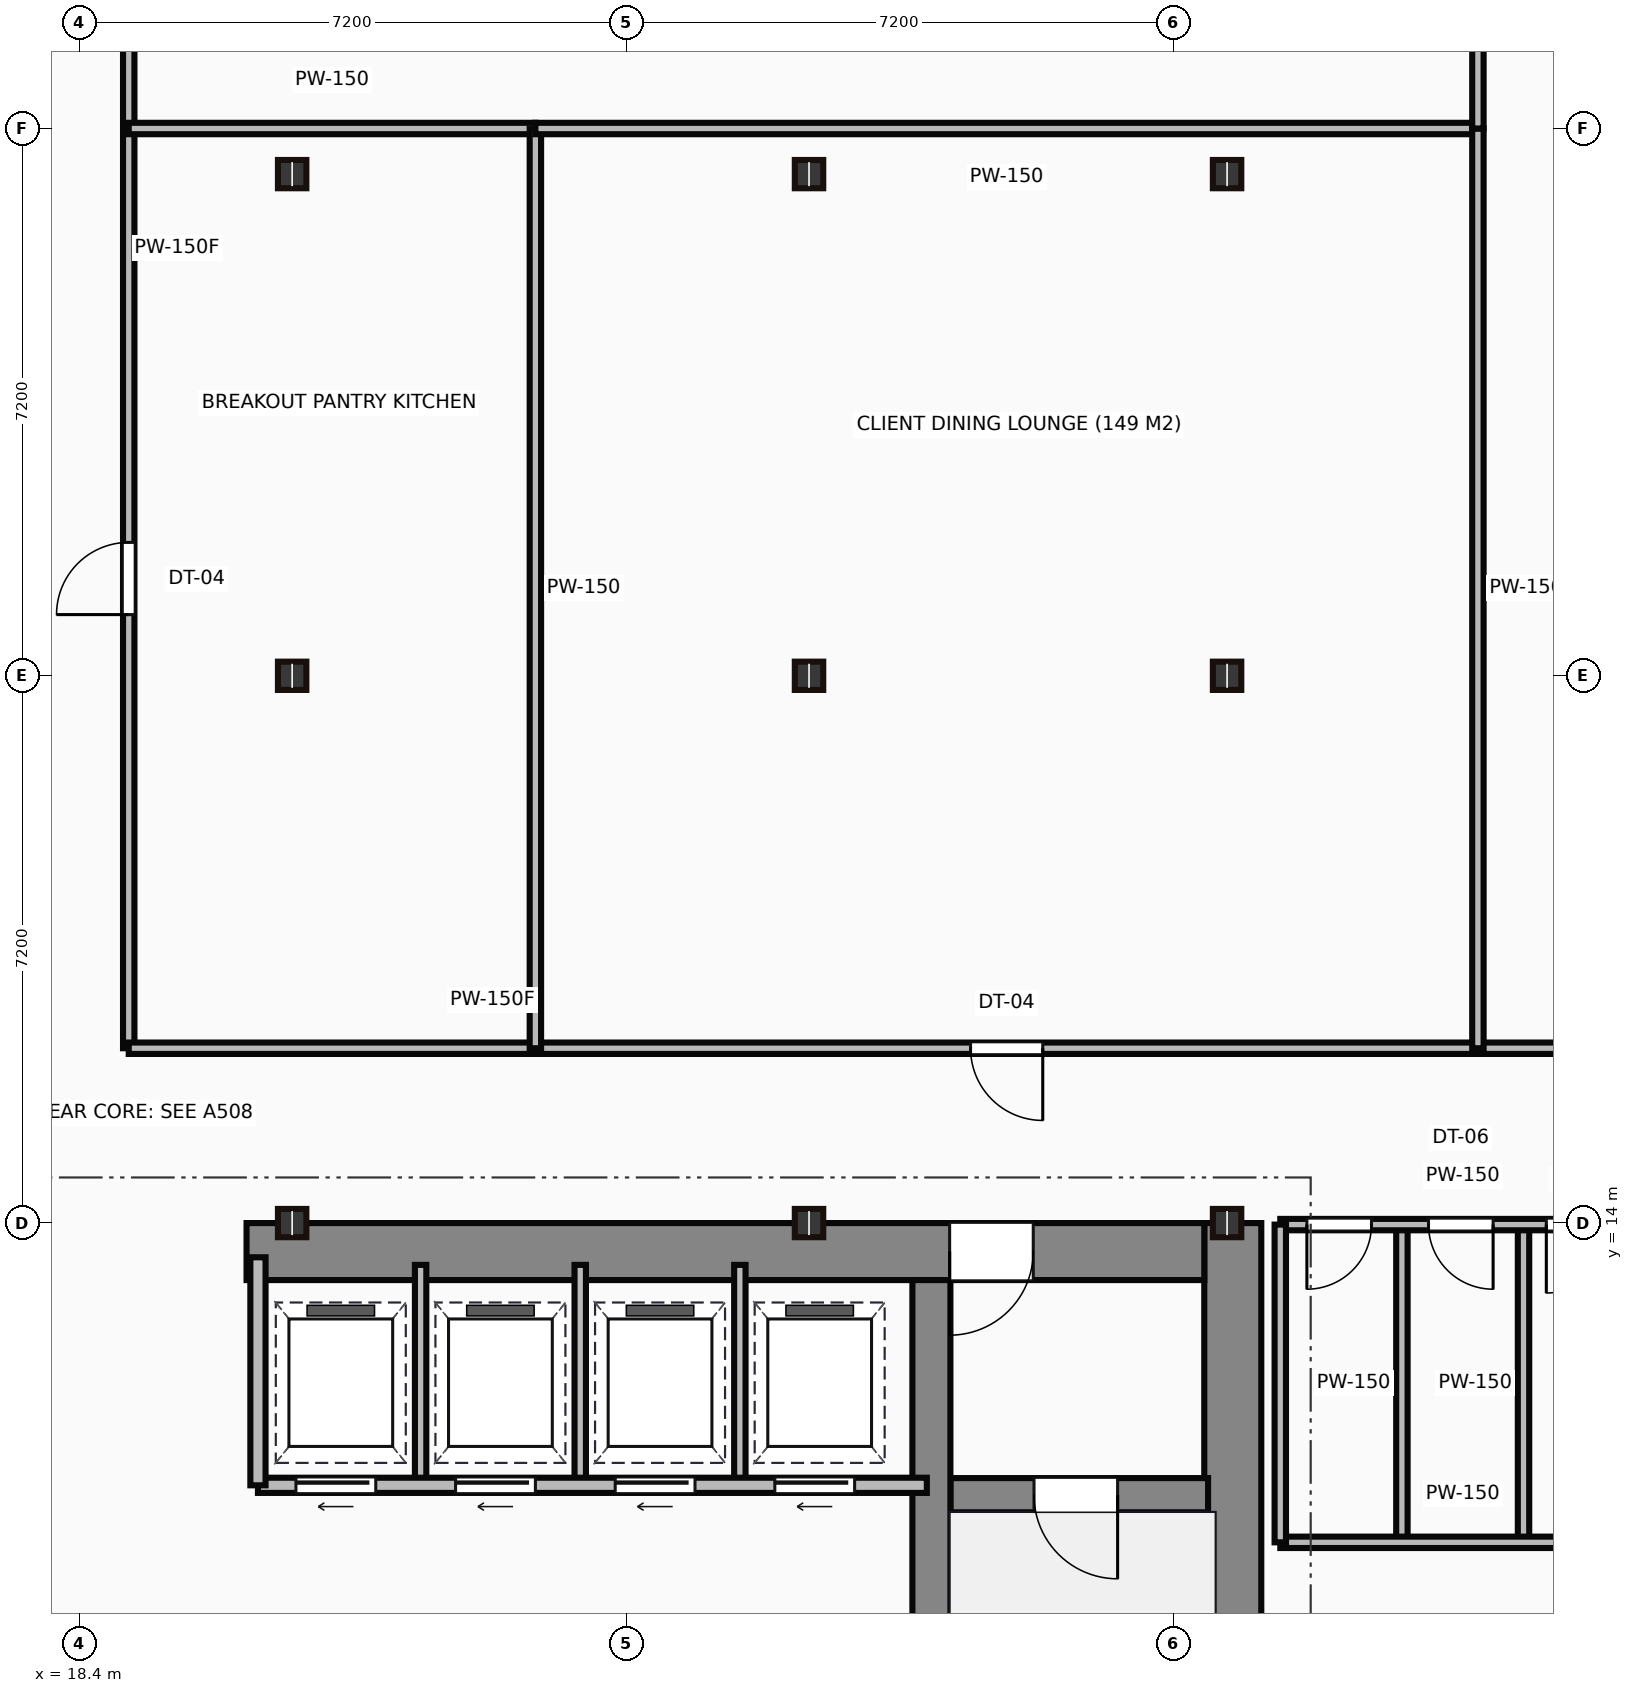
"""IFC4 building model, lengths in metres.
Left out: names, types, materials, properties, quantities, classifications, styles, units other than length and angle.
Written with IfcOpenShell. Run it as: python <this file> out.ifc"""

import sys

from ifc_helpers import new_model, si_unit, direction, frame, frame_2d, origin, origin_2d, place, context, subcontext, project, spatial, rectangle, i_section, extrude, source, transform, mapped, element, fill, save


model = new_model("IFC4")
c1 = context("Model", 3, precision=1e-05, world=origin(), true_north=direction((0.0, 1.0)))
c2 = subcontext(c1, "Body", "Model", "MODEL_VIEW")
j1 = project(units=[si_unit("LENGTHUNIT", "METRE"), si_unit("PLANEANGLEUNIT", "RADIAN")], contexts=[c1])
p1 = place(None, origin())
s1 = spatial("IfcSite", under=j1, at=p1, CompositionType="ELEMENT")
p2 = place(p1, origin())
s2 = spatial("IfcBuilding", under=s1, at=p2, CompositionType="ELEMENT")
p3 = place(p2, frame((0.0, 0.0, 184.4)))
s3 = spatial("IfcBuildingStorey", under=s2, at=p3, CompositionType="ELEMENT", Elevation=184.4)
m1 = source(origin(), c2, "Body", "SweptSolid", [
    extrude(rectangle(XDim=13.1, YDim=0.75, at=frame_2d((6.55, 0.0))), origin(), (0.0, 0.0, 1.0), 4.2),
])
p4 = place(p3, frame((33.575, 0.9, 0.0), z_axis=(0.0, 0.0, 1.0), x_axis=(0.0, 1.0, 0.0)))
e1 = element("IfcWall", 1, at=p4, inside=s3, PredefinedType="SHEAR", context=c2, shape_type="MappedRepresentation", body=[
    mapped(m1, transform((0.0, 0.0, 0.0))),
])
m2 = source(origin(), c2, "Body", "SweptSolid", [
    extrude(rectangle(XDim=12.6, YDim=0.75, at=frame_2d((6.3, 0.0))), origin(), (0.0, 0.0, 1.0), 4.2),
])
p5 = place(p3, frame((20.6, 13.625, 0.0), z_axis=(0.0, 0.0, 1.0), x_axis=(1.0, 0.0, 0.0)))
e2 = element("IfcWall", 2, at=p5, inside=s3, PredefinedType="SHEAR", context=c2, shape_type="MappedRepresentation", body=[
    mapped(m2, transform((0.0, 0.0, 0.0))),
])
p6 = place(p5, frame((9.25, 0.0, 0.0)))
e3 = element("IfcOpeningElement", 3, at=p6, cuts=e2, PredefinedType="OPENING", context=c2, shape_type="SweptSolid", body=[
    extrude(rectangle(XDim=1.1, YDim=2.15, at=frame_2d((0.55, 1.075))), frame((0.0, 0.385, 0.0), z_axis=(0.0, -1.0, 0.0), x_axis=(1.0, 0.0, 0.0)), (0.0, 0.0, 1.0), 0.77),
])
m3 = source(origin(), c2, "Body", "SweptSolid", [
    extrude(rectangle(XDim=12.35, YDim=0.5, at=frame_2d((6.175, 0.0))), origin(), (0.0, 0.0, 1.0), 4.2),
])
p7 = place(p3, frame((29.61, 0.9, 0.0), z_axis=(0.0, 0.0, 1.0), x_axis=(0.0, 1.0, 0.0)))
e4 = element("IfcWall", 4, at=p7, inside=s3, PredefinedType="SHEAR", context=c2, shape_type="MappedRepresentation", body=[
    mapped(m3, transform((0.0, 0.0, 0.0))),
])
m4 = source(origin(), c2, "Body", "SweptSolid", [
    extrude(rectangle(XDim=3.39, YDim=0.45, at=frame_2d((1.695, 0.0))), origin(), (0.0, 0.0, 1.0), 4.2),
])
p8 = place(p3, frame((29.86, 10.42, 0.0), z_axis=(0.0, 0.0, 1.0), x_axis=(1.0, 0.0, 0.0)))
e5 = element("IfcWall", 5, at=p8, inside=s3, PredefinedType="SHEAR", context=c2, shape_type="MappedRepresentation", body=[
    mapped(m4, transform((0.0, 0.0, 0.0))),
])
p9 = place(p8, frame((1.1, 0.0, 0.0)))
e6 = element("IfcOpeningElement", 6, at=p9, cuts=e5, PredefinedType="OPENING", context=c2, shape_type="SweptSolid", body=[
    extrude(rectangle(XDim=1.1, YDim=2.15, at=frame_2d((0.55, 1.075))), frame((0.0, 0.235, 0.0), z_axis=(0.0, -1.0, 0.0), x_axis=(1.0, 0.0, 0.0)), (0.0, 0.0, 1.0), 0.47),
])
m5 = source(origin(), c2, "Body", "SweptSolid", [
    extrude(i_section(OverallWidth=0.374, OverallDepth=0.372, WebThickness=0.016, FlangeThickness=0.026, at=origin_2d()), origin(), (0.0, 0.0, 1.0), 4.2),
])
for number, where, z_axis, x_axis in (
    (7, (21.2, 14.0, 0.0), (0.0, 0.0, 1.0), (1.0, 0.0, 0.0)),
    (8, (21.2, 21.2, 0.0), (0.0, 0.0, 1.0), (1.0, 0.0, 0.0)),
    (9, (21.2, 27.8, 0.0), (0.0, 0.0, 1.0), (1.0, 0.0, 0.0)),
    (10, (28.0, 14.0, 0.0), (0.0, 0.0, 1.0), (1.0, 0.0, 0.0)),
    (11, (28.0, 21.2, 0.0), (0.0, 0.0, 1.0), (1.0, 0.0, 0.0)),
    (12, (28.0, 27.8, 0.0), (0.0, 0.0, 1.0), (1.0, 0.0, 0.0)),
    (13, (33.5, 14.0, 0.0), (0.0, 0.0, 1.0), (1.0, 0.0, 0.0)),
    (14, (33.5, 21.2, 0.0), (0.0, 0.0, 1.0), (1.0, 0.0, 0.0)),
    (15, (33.5, 27.8, 0.0), (0.0, 0.0, 1.0), (1.0, 0.0, 0.0)),
):
    element("IfcColumn", number, at=place(p3, frame(where, z_axis=z_axis, x_axis=x_axis)), inside=s3, PredefinedType="COLUMN", context=c2, shape_type="MappedRepresentation", body=[
        mapped(m5, transform((0.0, 0.0, 0.0))),
    ])
m6 = source(origin(), c2, "Body", "SweptSolid", [
    extrude(rectangle(XDim=8.8, YDim=0.2, at=frame_2d((4.4, 0.0))), origin(), (0.0, 0.0, 1.0), 3.95),
])
p10 = place(p3, frame((20.75, 10.55, 0.0), z_axis=(0.0, 0.0, 1.0), x_axis=(1.0, 0.0, 0.0)))
e16 = element("IfcWall", 16, at=p10, inside=s3, PredefinedType="PARTITIONING", context=c2, shape_type="MappedRepresentation", body=[
    mapped(m6, transform((0.0, 0.0, 0.0))),
])
p11 = place(p10, frame((0.5, 0.0, 0.0)))
e17 = element("IfcOpeningElement", 17, at=p11, cuts=e16, PredefinedType="OPENING", context=c2, shape_type="SweptSolid", body=[
    extrude(rectangle(XDim=1.05, YDim=2.15, at=frame_2d((0.525, 1.075))), frame((0.0, 0.11, 0.0), z_axis=(0.0, -1.0, 0.0), x_axis=(1.0, 0.0, 0.0)), (0.0, 0.0, 1.0), 0.22),
])
p12 = place(p10, frame((2.6, 0.0, 0.0)))
e18 = element("IfcOpeningElement", 18, at=p12, cuts=e16, PredefinedType="OPENING", context=c2, shape_type="SweptSolid", body=[
    extrude(rectangle(XDim=1.05, YDim=2.15, at=frame_2d((0.525, 1.075))), frame((0.0, 0.11, 0.0), z_axis=(0.0, -1.0, 0.0), x_axis=(1.0, 0.0, 0.0)), (0.0, 0.0, 1.0), 0.22),
])
p13 = place(p10, frame((4.7, 0.0, 0.0)))
e19 = element("IfcOpeningElement", 19, at=p13, cuts=e16, PredefinedType="OPENING", context=c2, shape_type="SweptSolid", body=[
    extrude(rectangle(XDim=1.05, YDim=2.15, at=frame_2d((0.525, 1.075))), frame((0.0, 0.11, 0.0), z_axis=(0.0, -1.0, 0.0), x_axis=(1.0, 0.0, 0.0)), (0.0, 0.0, 1.0), 0.22),
])
p14 = place(p10, frame((6.8, 0.0, 0.0)))
e20 = element("IfcOpeningElement", 20, at=p14, cuts=e16, PredefinedType="OPENING", context=c2, shape_type="SweptSolid", body=[
    extrude(rectangle(XDim=1.05, YDim=2.15, at=frame_2d((0.525, 1.075))), frame((0.0, 0.11, 0.0), z_axis=(0.0, -1.0, 0.0), x_axis=(1.0, 0.0, 0.0)), (0.0, 0.0, 1.0), 0.22),
])
m7 = source(origin(), c2, "Body", "SweptSolid", [
    extrude(rectangle(XDim=3.0, YDim=0.2, at=frame_2d((1.5, 0.0))), origin(), (0.0, 0.0, 1.0), 3.95),
])
p15 = place(p3, frame((20.75, 10.55, 0.0), z_axis=(0.0, 0.0, 1.0), x_axis=(0.0, 1.0, 0.0)))
e21 = element("IfcWall", 21, at=p15, inside=s3, PredefinedType="PARTITIONING", context=c2, shape_type="MappedRepresentation", body=[
    mapped(m7, transform((0.0, 0.0, 0.0))),
])
m8 = source(origin(), c2, "Body", "SweptSolid", [
    extrude(rectangle(XDim=2.85, YDim=0.15, at=frame_2d((1.425, 0.0))), origin(), (0.0, 0.0, 1.0), 3.95),
])
for number, where, z_axis, x_axis in (
    (22, (22.89, 10.6, 0.0), (0.0, 0.0, 1.0), (0.0, 1.0, 0.0)),
    (23, (24.99, 10.6, 0.0), (0.0, 0.0, 1.0), (0.0, 1.0, 0.0)),
    (24, (27.09, 10.6, 0.0), (0.0, 0.0, 1.0), (0.0, 1.0, 0.0)),
):
    element("IfcWall", number, at=place(p3, frame(where, z_axis=z_axis, x_axis=x_axis)), inside=s3, PredefinedType="PARTITIONING", context=c2, shape_type="MappedRepresentation", body=[
        mapped(m8, transform((0.0, 0.0, 0.0))),
    ])
m9 = source(origin(), c2, "Body", "SweptSolid", [
    extrude(rectangle(XDim=4.8, YDim=0.15, at=frame_2d((2.4, 0.0))), origin(), (0.0, 0.0, 1.0), 2.895),
])
p16 = place(p3, frame((34.2, 13.98, 0.0), z_axis=(0.0, 0.0, 1.0), x_axis=(1.0, 0.0, 0.0)))
e25 = element("IfcWall", 25, at=p16, inside=s3, PredefinedType="PARTITIONING", context=c2, shape_type="MappedRepresentation", body=[
    mapped(m9, transform((0.0, 0.0, 0.0))),
])
p17 = place(p16, frame((0.35, 0.0, 0.0)))
e26 = element("IfcOpeningElement", 26, at=p17, cuts=e25, PredefinedType="OPENING", context=c2, shape_type="SweptSolid", body=[
    extrude(rectangle(XDim=0.85, YDim=2.1, at=frame_2d((0.425, 1.05))), frame((0.0, 0.085, 0.0), z_axis=(0.0, -1.0, 0.0), x_axis=(1.0, 0.0, 0.0)), (0.0, 0.0, 1.0), 0.17),
])
p18 = place(p16, frame((1.95, 0.0, 0.0)))
e27 = element("IfcOpeningElement", 27, at=p18, cuts=e25, PredefinedType="OPENING", context=c2, shape_type="SweptSolid", body=[
    extrude(rectangle(XDim=0.85, YDim=2.1, at=frame_2d((0.425, 1.05))), frame((0.0, 0.085, 0.0), z_axis=(0.0, -1.0, 0.0), x_axis=(1.0, 0.0, 0.0)), (0.0, 0.0, 1.0), 0.17),
])
p19 = place(p16, frame((3.5, 0.0, 0.0)))
e28 = element("IfcOpeningElement", 28, at=p19, cuts=e25, PredefinedType="OPENING", context=c2, shape_type="SweptSolid", body=[
    extrude(rectangle(XDim=0.9, YDim=2.1, at=frame_2d((0.45, 1.05))), frame((0.0, 0.085, 0.0), z_axis=(0.0, -1.0, 0.0), x_axis=(1.0, 0.0, 0.0)), (0.0, 0.0, 1.0), 0.17),
])
m10 = source(origin(), c2, "Body", "SweptSolid", [
    extrude(rectangle(XDim=4.8, YDim=0.15, at=frame_2d((2.4, 0.0))), origin(), (0.0, 0.0, 1.0), 3.95),
])
p20 = place(p3, frame((34.2, 9.8, 0.0), z_axis=(0.0, 0.0, 1.0), x_axis=(1.0, 0.0, 0.0)))
e29 = element("IfcWall", 29, at=p20, inside=s3, PredefinedType="PARTITIONING", context=c2, shape_type="MappedRepresentation", body=[
    mapped(m10, transform((0.0, 0.0, 0.0))),
])
m11 = source(origin(), c2, "Body", "SweptSolid", [
    extrude(rectangle(XDim=4.18, YDim=0.15, at=frame_2d((2.09, 0.0))), origin(), (0.0, 0.0, 1.0), 3.95),
])
for number, where, z_axis, x_axis in (
    (30, (34.2, 9.8, 0.0), (0.0, 0.0, 1.0), (0.0, 1.0, 0.0)),
    (31, (35.8, 9.8, 0.0), (0.0, 0.0, 1.0), (0.0, 1.0, 0.0)),
    (32, (37.4, 9.8, 0.0), (0.0, 0.0, 1.0), (0.0, 1.0, 0.0)),
):
    element("IfcWall", number, at=place(p3, frame(where, z_axis=z_axis, x_axis=x_axis)), inside=s3, PredefinedType="PARTITIONING", context=c2, shape_type="MappedRepresentation", body=[
        mapped(m11, transform((0.0, 0.0, 0.0))),
    ])
m12 = source(origin(), c2, "Body", "SweptSolid", [
    extrude(rectangle(XDim=13.5, YDim=0.15, at=frame_2d((6.75, 0.0))), origin(), (0.0, 0.0, 1.0), 3.95),
])
p21 = place(p3, frame((19.05, 29.8, 0.0), z_axis=(0.0, 0.0, 1.0), x_axis=(0.0, -1.0, 0.0)))
e33 = element("IfcWall", 33, at=p21, inside=s3, PredefinedType="PARTITIONING", context=c2, shape_type="MappedRepresentation", body=[
    mapped(m12, transform((0.0, 0.0, 0.0))),
])
p22 = place(p21, frame((6.845, 0.0, 0.0)))
e34 = element("IfcOpeningElement", 34, at=p22, cuts=e33, PredefinedType="OPENING", context=c2, shape_type="SweptSolid", body=[
    extrude(rectangle(XDim=0.95, YDim=2.15, at=frame_2d((0.475, 1.075))), frame((0.0, 0.085, 0.0), z_axis=(0.0, -1.0, 0.0), x_axis=(1.0, 0.0, 0.0)), (0.0, 0.0, 1.0), 0.17),
])
m13 = source(origin(), c2, "Body", "SweptSolid", [
    extrude(rectangle(XDim=21.75, YDim=0.15, at=frame_2d((10.875, 0.0))), origin(), (0.0, 0.0, 1.0), 3.95),
])
p23 = place(p3, frame((19.05, 16.3, 0.0), z_axis=(0.0, 0.0, 1.0), x_axis=(1.0, 0.0, 0.0)))
e35 = element("IfcWall", 35, at=p23, inside=s3, PredefinedType="PARTITIONING", context=c2, shape_type="MappedRepresentation", body=[
    mapped(m13, transform((0.0, 0.0, 0.0))),
])
p24 = place(p23, frame((11.075, 0.0, 0.0)))
e36 = element("IfcOpeningElement", 36, at=p24, cuts=e35, PredefinedType="OPENING", context=c2, shape_type="SweptSolid", body=[
    extrude(rectangle(XDim=0.95, YDim=2.15, at=frame_2d((0.475, 1.075))), frame((0.0, 0.085, 0.0), z_axis=(0.0, -1.0, 0.0), x_axis=(1.0, 0.0, 0.0)), (0.0, 0.0, 1.0), 0.17),
])
p25 = place(p23, frame((19.145, 0.0, 0.0)))
e37 = element("IfcOpeningElement", 37, at=p25, cuts=e35, PredefinedType="OPENING", context=c2, shape_type="SweptSolid", body=[
    extrude(rectangle(XDim=0.95, YDim=2.15, at=frame_2d((0.475, 1.075))), frame((0.0, 0.085, 0.0), z_axis=(0.0, -1.0, 0.0), x_axis=(1.0, 0.0, 0.0)), (0.0, 0.0, 1.0), 0.17),
])
m14 = source(origin(), c2, "Body", "SweptSolid", [
    extrude(rectangle(XDim=5.35, YDim=0.15, at=frame_2d((2.675, 0.0))), origin(), (0.0, 0.0, 1.0), 3.95),
])
p26 = place(p3, frame((19.05, 28.4, 0.0), z_axis=(0.0, 0.0, 1.0), x_axis=(1.0, 0.0, 0.0)))
e38 = element("IfcWall", 38, at=p26, inside=s3, PredefinedType="PARTITIONING", context=c2, shape_type="MappedRepresentation", body=[
    mapped(m14, transform((0.0, 0.0, 0.0))),
])
m15 = source(origin(), c2, "Body", "SweptSolid", [
    extrude(rectangle(XDim=12.1, YDim=0.15, at=frame_2d((6.05, 0.0))), origin(), (0.0, 0.0, 1.0), 3.95),
])
p27 = place(p3, frame((24.4, 28.4, 0.0), z_axis=(0.0, 0.0, 1.0), x_axis=(0.0, -1.0, 0.0)))
e39 = element("IfcWall", 39, at=p27, inside=s3, PredefinedType="PARTITIONING", context=c2, shape_type="MappedRepresentation", body=[
    mapped(m15, transform((0.0, 0.0, 0.0))),
])
m16 = source(origin(), c2, "Body", "SweptSolid", [
    extrude(rectangle(XDim=12.4, YDim=0.15, at=frame_2d((6.2, 0.0))), origin(), (0.0, 0.0, 1.0), 3.95),
])
p28 = place(p3, frame((36.8, 28.4, 0.0), z_axis=(0.0, 0.0, 1.0), x_axis=(-1.0, 0.0, 0.0)))
e40 = element("IfcWall", 40, at=p28, inside=s3, PredefinedType="PARTITIONING", context=c2, shape_type="MappedRepresentation", body=[
    mapped(m16, transform((0.0, 0.0, 0.0))),
])
p29 = place(p3, frame((36.8, 28.4, 0.0), z_axis=(0.0, 0.0, 1.0), x_axis=(0.0, -1.0, 0.0)))
e41 = element("IfcWall", 41, at=p29, inside=s3, PredefinedType="PARTITIONING", context=c2, shape_type="MappedRepresentation", body=[
    mapped(m15, transform((0.0, 0.0, 0.0))),
])
m17 = source(origin(), c2, "Body", "SweptSolid", [
    extrude(rectangle(XDim=11.608, YDim=0.15, at=frame_2d((5.804, 0.0))), origin(), (0.0, 0.0, 1.0), 3.95),
])
p30 = place(p3, frame((36.8, 40.008, 0.0), z_axis=(0.0, 0.0, 1.0), x_axis=(0.0, -1.0, 0.0)))
e42 = element("IfcWall", 42, at=p30, inside=s3, PredefinedType="PARTITIONING", context=c2, shape_type="MappedRepresentation", body=[
    mapped(m17, transform((0.0, 0.0, 0.0))),
])
m18 = source(origin(), c2, "Body", "SweptSolid", [
    extrude(rectangle(XDim=1.1, YDim=2.15, at=frame_2d((0.55, 1.075))), frame((0.0, 0.025, 0.0), z_axis=(0.0, -1.0, 0.0), x_axis=(1.0, 0.0, 0.0)), (0.0, 0.0, 1.0), 0.05),
])
p31 = place(p9, frame((1.1, 0.0, 0.0), z_axis=(0.0, 0.0, 1.0), x_axis=(-1.0, 0.0, 0.0)))
e43 = element("IfcDoor", 43, at=p31, inside=s3, OperationType="SINGLE_SWING_RIGHT", PredefinedType="DOOR", context=c2, shape_type="MappedRepresentation", body=[
    mapped(m18, transform((0.0, 0.0, 0.0))),
])
fill(e6, e43)
p32 = place(p6, origin())
e44 = element("IfcDoor", 44, at=p32, inside=s3, OperationType="SINGLE_SWING_LEFT", PredefinedType="DOOR", context=c2, shape_type="MappedRepresentation", body=[
    mapped(m18, transform((0.0, 0.0, 0.0))),
])
fill(e3, e44)
m19 = source(origin(), c2, "Body", "SweptSolid", [
    extrude(rectangle(XDim=1.05, YDim=2.15, at=frame_2d((0.525, 1.075))), frame((0.0, 0.025, 0.0), z_axis=(0.0, -1.0, 0.0), x_axis=(1.0, 0.0, 0.0)), (0.0, 0.0, 1.0), 0.05),
])
p33 = place(p11, frame((1.05, 0.0, 0.0), z_axis=(0.0, 0.0, 1.0), x_axis=(-1.0, 0.0, 0.0)))
e45 = element("IfcDoor", 45, at=p33, inside=s3, OperationType="SLIDING_TO_LEFT", PredefinedType="DOOR", context=c2, shape_type="MappedRepresentation", body=[
    mapped(m19, transform((0.0, 0.0, 0.0))),
])
fill(e17, e45)
p34 = place(p12, frame((1.05, 0.0, 0.0), z_axis=(0.0, 0.0, 1.0), x_axis=(-1.0, 0.0, 0.0)))
e46 = element("IfcDoor", 46, at=p34, inside=s3, OperationType="SLIDING_TO_LEFT", PredefinedType="DOOR", context=c2, shape_type="MappedRepresentation", body=[
    mapped(m19, transform((0.0, 0.0, 0.0))),
])
fill(e18, e46)
p35 = place(p13, frame((1.05, 0.0, 0.0), z_axis=(0.0, 0.0, 1.0), x_axis=(-1.0, 0.0, 0.0)))
e47 = element("IfcDoor", 47, at=p35, inside=s3, OperationType="SLIDING_TO_LEFT", PredefinedType="DOOR", context=c2, shape_type="MappedRepresentation", body=[
    mapped(m19, transform((0.0, 0.0, 0.0))),
])
fill(e19, e47)
p36 = place(p14, frame((1.05, 0.0, 0.0), z_axis=(0.0, 0.0, 1.0), x_axis=(-1.0, 0.0, 0.0)))
e48 = element("IfcDoor", 48, at=p36, inside=s3, OperationType="SLIDING_TO_LEFT", PredefinedType="DOOR", context=c2, shape_type="MappedRepresentation", body=[
    mapped(m19, transform((0.0, 0.0, 0.0))),
])
fill(e20, e48)
m20 = source(origin(), c2, "Body", "SweptSolid", [
    extrude(rectangle(XDim=0.85, YDim=2.1, at=frame_2d((0.425, 1.05))), frame((0.0, 0.025, 0.0), z_axis=(0.0, -1.0, 0.0), x_axis=(1.0, 0.0, 0.0)), (0.0, 0.0, 1.0), 0.05),
])
p37 = place(p17, frame((0.85, 0.0, 0.0), z_axis=(0.0, 0.0, 1.0), x_axis=(-1.0, 0.0, 0.0)))
e49 = element("IfcDoor", 49, at=p37, inside=s3, OperationType="SINGLE_SWING_LEFT", PredefinedType="DOOR", context=c2, shape_type="MappedRepresentation", body=[
    mapped(m20, transform((0.0, 0.0, 0.0))),
])
fill(e26, e49)
p38 = place(p18, frame((0.85, 0.0, 0.0), z_axis=(0.0, 0.0, 1.0), x_axis=(-1.0, 0.0, 0.0)))
e50 = element("IfcDoor", 50, at=p38, inside=s3, OperationType="SINGLE_SWING_RIGHT", PredefinedType="DOOR", context=c2, shape_type="MappedRepresentation", body=[
    mapped(m20, transform((0.0, 0.0, 0.0))),
])
fill(e27, e50)
m21 = source(origin(), c2, "Body", "SweptSolid", [
    extrude(rectangle(XDim=0.9, YDim=2.1, at=frame_2d((0.45, 1.05))), frame((0.0, 0.025, 0.0), z_axis=(0.0, -1.0, 0.0), x_axis=(1.0, 0.0, 0.0)), (0.0, 0.0, 1.0), 0.05),
])
p39 = place(p19, frame((0.9, 0.0, 0.0), z_axis=(0.0, 0.0, 1.0), x_axis=(-1.0, 0.0, 0.0)))
e51 = element("IfcDoor", 51, at=p39, inside=s3, OperationType="SINGLE_SWING_LEFT", PredefinedType="DOOR", context=c2, shape_type="MappedRepresentation", body=[
    mapped(m21, transform((0.0, 0.0, 0.0))),
])
fill(e28, e51)
m22 = source(origin(), c2, "Body", "SweptSolid", [
    extrude(rectangle(XDim=0.95, YDim=2.15, at=frame_2d((0.475, 1.075))), frame((0.0, 0.025, 0.0), z_axis=(0.0, -1.0, 0.0), x_axis=(1.0, 0.0, 0.0)), (0.0, 0.0, 1.0), 0.05),
])
p40 = place(p22, origin())
e52 = element("IfcDoor", 52, at=p40, inside=s3, OperationType="SINGLE_SWING_RIGHT", PredefinedType="DOOR", context=c2, shape_type="MappedRepresentation", body=[
    mapped(m22, transform((0.0, 0.0, 0.0))),
])
fill(e34, e52)
p41 = place(p24, origin())
e53 = element("IfcDoor", 53, at=p41, inside=s3, OperationType="SINGLE_SWING_RIGHT", PredefinedType="DOOR", context=c2, shape_type="MappedRepresentation", body=[
    mapped(m22, transform((0.0, 0.0, 0.0))),
])
fill(e36, e53)
save(model, sys.argv[1])
